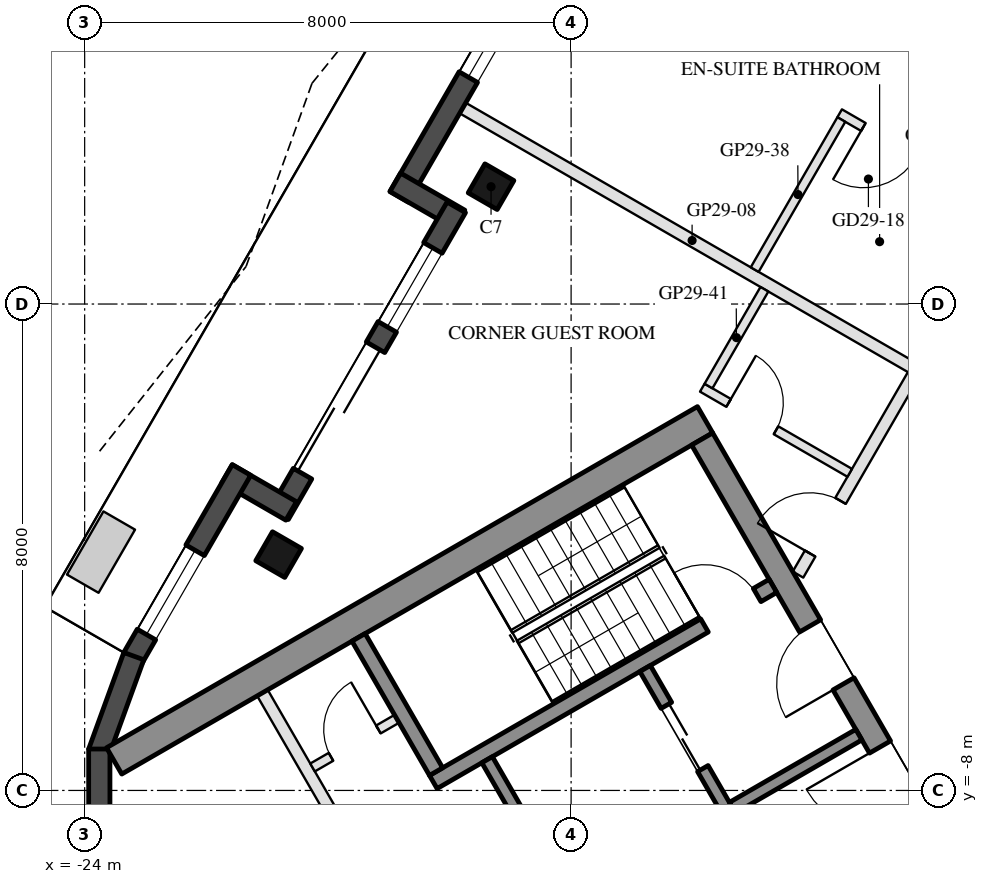
"""IFC4 building model, lengths in metres.
Left out: names, types, materials, properties, quantities, classifications, styles, units other than length and angle.
Written with IfcOpenShell. Run it as: python <this file> out.ifc"""

import sys

from ifc_helpers import new_model, si_unit, direction, frame, frame_2d, origin, origin_2d, place, context, subcontext, project, spatial, rectangle, hollow_rectangle, extrude, boolean, halfspace, element, fill, save


model = new_model("IFC4")
c1 = context("Model", 3, precision=1e-05, world=origin(), true_north=direction((0.0, 1.0)))
c2 = subcontext(c1, "Body", "Model", "MODEL_VIEW")
j1 = project(units=[si_unit("LENGTHUNIT", "METRE"), si_unit("PLANEANGLEUNIT", "RADIAN")], contexts=[c1])
p1 = place(None, origin())
s1 = spatial("IfcSite", under=j1, at=p1, CompositionType="ELEMENT")
p2 = place(p1, origin())
s2 = spatial("IfcBuilding", under=s1, at=p2, CompositionType="ELEMENT")
p3 = place(p2, frame((0.0, 0.0, 294.8)))
s3 = spatial("IfcBuildingStorey", under=s2, at=p3, CompositionType="ELEMENT", Elevation=294.8)
p4 = place(p3, frame((-17.317, 1.93, 0.0), z_axis=(0.0, 0.0, 1.0), x_axis=(0.5, 0.866025403784, 0.0)))
e1 = element("IfcColumn", 1, at=p4, inside=s3, PredefinedType="COLUMN", context=c2, shape_type="SweptSolid", body=[
    boolean("DIFFERENCE", extrude(hollow_rectangle(XDim=0.55, YDim=0.55, WallThickness=0.025, at=origin_2d()), origin(), (0.0, 0.0, 1.0), 3.7), halfspace(frame((0.0, 0.0, 3.666), z_axis=(0.0, 0.0, 1.0), x_axis=(1.0, 0.0, 0.0)), False)),
])
p5 = place(p3, frame((-20.81, -4.121, 0.0), z_axis=(0.0, 0.0, 1.0), x_axis=(0.5, 0.866025403784, 0.0)))
e2 = element("IfcColumn", 2, at=p5, inside=s3, PredefinedType="COLUMN", context=c2, shape_type="SweptSolid", body=[
    boolean("DIFFERENCE", extrude(hollow_rectangle(XDim=0.55, YDim=0.55, WallThickness=0.025, at=origin_2d()), origin(), (0.0, 0.0, 1.0), 3.7), halfspace(frame((0.0, 0.0, 3.66), z_axis=(0.0, 0.0, 1.0), x_axis=(1.0, 0.0, 0.0)), False)),
])
p6 = place(p3, frame((-14.434, 9.373, 0.0), z_axis=(0.0, 0.0, 1.0), x_axis=(-0.499999835575, -0.866025498715, 0.0)))
e3 = element("IfcWall", 3, at=p6, inside=s3, PredefinedType="SOLIDWALL", context=c2, shape_type="SweptSolid", body=[
    extrude(rectangle(XDim=8.787, YDim=0.35, at=frame_2d((4.394, 0.0))), origin(), (0.0, 0.0, 1.0), 3.55),
])
p7 = place(p6, frame((1.719, 0.0, 0.0)))
e4 = element("IfcOpeningElement", 4, at=p7, cuts=e3, PredefinedType="OPENING", context=c2, shape_type="SweptSolid", body=[
    extrude(rectangle(XDim=2.4, YDim=2.4, at=frame_2d((1.2, 1.2))), frame((0.0, 0.185, 0.0), z_axis=(0.0, -1.0, 0.0), x_axis=(1.0, 0.0, 0.0)), (0.0, 0.0, 1.0), 0.37),
])
p8 = place(p6, frame((5.013, 0.0, 0.3)))
e5 = element("IfcOpeningElement", 5, at=p8, cuts=e3, PredefinedType="OPENING", context=c2, shape_type="SweptSolid", body=[
    extrude(rectangle(XDim=1.5, YDim=2.65, at=frame_2d((0.75, 1.325))), frame((0.0, 0.185, 0.0), z_axis=(0.0, -1.0, 0.0), x_axis=(1.0, 0.0, 0.0)), (0.0, 0.0, 1.0), 0.37),
])
p9 = place(p3, frame((-18.892, 2.002, 0.0), z_axis=(0.0, 0.0, 1.0), x_axis=(0.866042269935, -0.499970785833, 0.0)))
e6 = element("IfcWall", 6, at=p9, inside=s3, PredefinedType="SOLIDWALL", context=c2, shape_type="SweptSolid", body=[
    extrude(rectangle(XDim=1.22, YDim=0.35, at=frame_2d((0.61, 0.0))), origin(), (0.0, 0.0, 1.0), 3.55),
])
p10 = place(p3, frame((-17.888, 1.59, 0.0), z_axis=(0.0, 0.0, 1.0), x_axis=(-0.499987198161, -0.866032794804, 0.0)))
e7 = element("IfcWall", 7, at=p10, inside=s3, PredefinedType="SOLIDWALL", context=c2, shape_type="SweptSolid", body=[
    extrude(rectangle(XDim=5.827, YDim=0.35, at=frame_2d((2.914, 0.0))), origin(), (0.0, 0.0, 1.0), 3.55),
])
p11 = place(p10, frame((2.657, 0.0, 0.0)))
e8 = element("IfcOpeningElement", 8, at=p11, cuts=e7, PredefinedType="OPENING", context=c2, shape_type="SweptSolid", body=[
    extrude(rectangle(XDim=2.4, YDim=2.4, at=frame_2d((1.2, 1.2))), frame((0.0, 0.185, 0.0), z_axis=(0.0, -1.0, 0.0), x_axis=(1.0, 0.0, 0.0)), (0.0, 0.0, 1.0), 0.37),
])
p12 = place(p10, frame((0.77, 0.0, 0.3)))
e9 = element("IfcOpeningElement", 9, at=p12, cuts=e7, PredefinedType="OPENING", context=c2, shape_type="SweptSolid", body=[
    extrude(rectangle(XDim=1.5, YDim=2.65, at=frame_2d((0.75, 1.325))), frame((0.0, 0.185, 0.0), z_axis=(0.0, -1.0, 0.0), x_axis=(1.0, 0.0, 0.0)), (0.0, 0.0, 1.0), 0.37),
])
p13 = place(p3, frame((-20.604, -3.403, 0.0), z_axis=(0.0, 0.0, 1.0), x_axis=(-0.866092288191, 0.499884134912, 0.0)))
e10 = element("IfcWall", 10, at=p13, inside=s3, PredefinedType="SOLIDWALL", context=c2, shape_type="SweptSolid", body=[
    extrude(rectangle(XDim=1.22, YDim=0.35, at=frame_2d((0.61, 0.0))), origin(), (0.0, 0.0, 1.0), 3.55),
])
p14 = place(p3, frame((-21.421, -2.729, 0.0), z_axis=(0.0, 0.0, 1.0), x_axis=(-0.500040399856, -0.86600207766, 0.0)))
e11 = element("IfcWall", 11, at=p14, inside=s3, PredefinedType="SOLIDWALL", context=c2, shape_type="SweptSolid", body=[
    extrude(rectangle(XDim=3.567, YDim=0.35, at=frame_2d((1.784, 0.0))), origin(), (0.0, 0.0, 1.0), 3.55),
])
p15 = place(p14, frame((1.525, 0.0, 0.3)))
e12 = element("IfcOpeningElement", 12, at=p15, cuts=e11, PredefinedType="OPENING", context=c2, shape_type="SweptSolid", body=[
    extrude(rectangle(XDim=1.6, YDim=2.65, at=frame_2d((0.8, 1.325))), frame((0.0, 0.185, 0.0), z_axis=(0.0, -1.0, 0.0), x_axis=(1.0, 0.0, 0.0)), (0.0, 0.0, 1.0), 0.37),
])
for number, where, z_axis, x_axis in (
    (13, (-23.192, -5.791, 0.0), (0.0, 0.0, 1.0), (-0.342, -0.94, 0.0)),
    (14, (-23.759, -7.319, 0.0), (0.0, 0.0, 1.0), (0.0, -1.0, 0.0)),
):
    element("IfcWall", number, at=place(p3, frame(where, z_axis=z_axis, x_axis=x_axis)), inside=s3, PredefinedType="SOLIDWALL", context=c2, shape_type="SweptSolid", body=[
        extrude(rectangle(XDim=1.689, YDim=0.35, at=frame_2d((0.845, 0.0))), origin(), (0.0, 0.0, 1.0), 3.55),
    ])
p16 = place(p3, frame((-13.797, -1.903, 0.0), z_axis=(0.0, 0.0, 1.0), x_axis=(-0.866025449148, -0.499999921427, 0.0)))
e15 = element("IfcWall", 15, at=p16, inside=s3, PredefinedType="SHEAR", context=c2, shape_type="SweptSolid", body=[
    extrude(rectangle(XDim=11.222, YDim=0.5, at=frame_2d((5.611, 0.0))), origin(), (0.0, 0.0, 1.0), 3.5),
])
p17 = place(p3, frame((-13.845, -2.22, 0.0), z_axis=(0.0, 0.0, 1.0), x_axis=(0.500004234368, -0.866022959057, 0.0)))
e16 = element("IfcWall", 16, at=p17, inside=s3, PredefinedType="SHEAR", context=c2, shape_type="SweptSolid", body=[
    extrude(rectangle(XDim=10.0, YDim=0.4, at=frame_2d((5.0, 0.0))), origin(), (0.0, 0.0, 1.0), 3.5),
])
p18 = place(p17, frame((3.55, 0.0, 0.0)))
e17 = element("IfcOpeningElement", 17, at=p18, cuts=e16, PredefinedType="OPENING", context=c2, shape_type="SweptSolid", body=[
    extrude(rectangle(XDim=1.1, YDim=2.1, at=frame_2d((0.55, 1.05))), frame((0.0, 0.21, 0.0), z_axis=(0.0, -1.0, 0.0), x_axis=(1.0, 0.0, 0.0)), (0.0, 0.0, 1.0), 0.42),
])
p19 = place(p17, frame((5.85, 0.0, 0.0)))
e18 = element("IfcOpeningElement", 18, at=p19, cuts=e16, PredefinedType="OPENING", context=c2, shape_type="SweptSolid", body=[
    extrude(rectangle(XDim=1.4, YDim=2.1, at=frame_2d((0.7, 1.05))), frame((0.0, 0.21, 0.0), z_axis=(0.0, -1.0, 0.0), x_axis=(1.0, 0.0, 0.0)), (0.0, 0.0, 1.0), 0.42),
])
p20 = place(p3, frame((-12.681, -4.636, 0.0), z_axis=(0.0, 0.0, 1.0), x_axis=(-0.866021702275, -0.500006411147, 0.0)))
e19 = element("IfcWall", 19, at=p20, inside=s3, PredefinedType="SHEAR", context=c2, shape_type="SweptSolid", body=[
    extrude(rectangle(XDim=6.45, YDim=0.25, at=frame_2d((3.225, 0.0))), origin(), (0.0, 0.0, 1.0), 3.5),
])
p21 = place(p20, frame((0.3, 0.0, 0.0)))
e20 = element("IfcOpeningElement", 20, at=p21, cuts=e19, PredefinedType="OPENING", context=c2, shape_type="SweptSolid", body=[
    extrude(rectangle(XDim=1.0, YDim=2.1, at=frame_2d((0.5, 1.05))), frame((0.0, 0.135, 0.0), z_axis=(0.0, -1.0, 0.0), x_axis=(1.0, 0.0, 0.0)), (0.0, 0.0, 1.0), 0.27),
])
p22 = place(p3, frame((-19.496, -5.482, 0.0), z_axis=(0.0, 0.0, 1.0), x_axis=(0.499990435942, -0.866030925526, 0.0)))
e21 = element("IfcWall", 21, at=p22, inside=s3, PredefinedType="SHEAR", context=c2, shape_type="SweptSolid", body=[
    extrude(rectangle(XDim=2.55, YDim=0.25, at=frame_2d((1.275, 0.0))), origin(), (0.0, 0.0, 1.0), 3.5),
])
p23 = place(p3, frame((-17.381, -7.495, 0.0), z_axis=(0.0, 0.0, 1.0), x_axis=(0.500011755427, -0.866018616679, 0.0)))
e22 = element("IfcWall", 22, at=p23, inside=s3, PredefinedType="SHEAR", context=c2, shape_type="SweptSolid", body=[
    extrude(rectangle(XDim=2.8, YDim=0.2, at=frame_2d((1.4, 0.0))), origin(), (0.0, 0.0, 1.0), 3.5),
])
p24 = place(p3, frame((-14.783, -5.995, 0.0), z_axis=(0.0, 0.0, 1.0), x_axis=(0.49994636267, -0.866056369097, 0.0)))
e23 = element("IfcWall", 23, at=p24, inside=s3, PredefinedType="SHEAR", context=c2, shape_type="SweptSolid", body=[
    extrude(rectangle(XDim=2.8, YDim=0.2, at=frame_2d((1.4, 0.0))), origin(), (0.0, 0.0, 1.0), 3.5),
])
p25 = place(p24, frame((0.7, 0.0, 0.0)))
e24 = element("IfcOpeningElement", 24, at=p25, cuts=e23, PredefinedType="OPENING", context=c2, shape_type="SweptSolid", body=[
    extrude(rectangle(XDim=1.2, YDim=2.1, at=frame_2d((0.6, 1.05))), frame((0.0, 0.11, 0.0), z_axis=(0.0, -1.0, 0.0), x_axis=(1.0, 0.0, 0.0)), (0.0, 0.0, 1.0), 0.22),
])
p26 = place(p3, frame((-11.268, -7.083, 0.0), z_axis=(0.0, 0.0, 1.0), x_axis=(-0.866050077142, -0.499957262057, 0.0)))
e25 = element("IfcWall", 25, at=p26, inside=s3, PredefinedType="SHEAR", context=c2, shape_type="SweptSolid", body=[
    extrude(rectangle(XDim=2.4, YDim=0.2, at=frame_2d((1.2, 0.0))), origin(), (0.0, 0.0, 1.0), 3.5),
])
p27 = place(p3, frame((-21.076, -6.395, 0.0), z_axis=(0.0, 0.0, 1.0), x_axis=(0.50001468107, -0.866016927499, 0.0)))
e26 = element("IfcWall", 26, at=p27, inside=s3, PredefinedType="PARTITIONING", context=c2, shape_type="SweptSolid", body=[
    extrude(rectangle(XDim=5.4, YDim=0.2, at=frame_2d((2.7, 0.0))), origin(), (0.0, 0.0, 1.0), 3.5),
])
p28 = place(p27, frame((2.9, 0.0, 0.0)))
e27 = element("IfcOpeningElement", 27, at=p28, cuts=e26, PredefinedType="OPENING", context=c2, shape_type="SweptSolid", body=[
    extrude(rectangle(XDim=0.9, YDim=2.1, at=frame_2d((0.45, 1.05))), frame((0.0, 0.11, 0.0), z_axis=(0.0, -1.0, 0.0), x_axis=(1.0, 0.0, 0.0)), (0.0, 0.0, 1.0), 0.22),
])
p29 = place(p3, frame((-18.866, -6.822, 0.0), z_axis=(0.0, 0.0, 1.0), x_axis=(-0.866028054938, -0.499995408039, 0.0)))
e28 = element("IfcWall", 28, at=p29, inside=s3, PredefinedType="PARTITIONING", context=c2, shape_type="SweptSolid", body=[
    extrude(rectangle(XDim=1.6, YDim=0.15, at=frame_2d((0.8, 0.0))), origin(), (0.0, 0.0, 1.0), 3.5),
])
p30 = place(p29, frame((0.35, 0.0, 0.0)))
e29 = element("IfcOpeningElement", 29, at=p30, cuts=e28, PredefinedType="OPENING", context=c2, shape_type="SweptSolid", body=[
    extrude(rectangle(XDim=0.9, YDim=2.1, at=frame_2d((0.45, 1.05))), frame((0.0, 0.085, 0.0), z_axis=(0.0, -1.0, 0.0), x_axis=(1.0, 0.0, 0.0)), (0.0, 0.0, 1.0), 0.17),
])
p31 = place(p3, frame((-17.782, 3.223, 0.0), z_axis=(0.0, 0.0, 1.0), x_axis=(0.866016642396, -0.500015174863, 0.0)))
e30 = element("IfcWall", 30, at=p31, inside=s3, PredefinedType="PARTITIONING", context=c2, shape_type="SweptSolid", body=[
    extrude(rectangle(XDim=8.712, YDim=0.2, at=frame_2d((4.356, 0.0))), origin(), (0.0, 0.0, 1.0), 3.1),
])
p32 = place(p3, frame((-8.899, 1.587, 0.0), z_axis=(0.0, 0.0, 1.0), x_axis=(-0.86602952684, 0.49999285859, 0.0)))
e31 = element("IfcWall", 31, at=p32, inside=s3, PredefinedType="PARTITIONING", context=c2, shape_type="SweptSolid", body=[
    extrude(rectangle(XDim=3.1, YDim=0.15, at=frame_2d((1.55, 0.0))), origin(), (0.0, 0.0, 1.0), 3.55),
])
p33 = place(p32, frame((1.65, 0.0, 0.0)))
e32 = element("IfcOpeningElement", 32, at=p33, cuts=e31, PredefinedType="OPENING", context=c2, shape_type="SweptSolid", body=[
    extrude(rectangle(XDim=1.0, YDim=2.1, at=frame_2d((0.5, 1.05))), frame((0.0, 0.085, 0.0), z_axis=(0.0, -1.0, 0.0), x_axis=(1.0, 0.0, 0.0)), (0.0, 0.0, 1.0), 0.17),
])
p34 = place(p3, frame((-11.556, 3.034, 0.0), z_axis=(0.0, 0.0, 1.0), x_axis=(-0.500036373335, -0.866004402611, 0.0)))
e33 = element("IfcWall", 33, at=p34, inside=s3, PredefinedType="PARTITIONING", context=c2, shape_type="SweptSolid", body=[
    extrude(rectangle(XDim=2.85, YDim=0.15, at=frame_2d((1.425, 0.0))), origin(), (0.0, 0.0, 1.0), 3.05),
])
p35 = place(p3, frame((-12.269, -4.45, 0.0), z_axis=(0.0, 0.0, 1.0), x_axis=(0.500055316652, 0.865993464345, 0.0)))
e34 = element("IfcWall", 34, at=p35, inside=s3, PredefinedType="PARTITIONING", context=c2, shape_type="SweptSolid", body=[
    extrude(rectangle(XDim=3.788, YDim=0.2, at=frame_2d((1.894, 0.0))), origin(), (0.0, 0.0, 1.0), 3.05),
])
p36 = place(p35, frame((0.4, 0.0, 0.0)))
e35 = element("IfcOpeningElement", 35, at=p36, cuts=e34, PredefinedType="OPENING", context=c2, shape_type="SweptSolid", body=[
    extrude(rectangle(XDim=1.0, YDim=2.1, at=frame_2d((0.5, 1.05))), frame((0.0, 0.11, 0.0), z_axis=(0.0, -1.0, 0.0), x_axis=(1.0, 0.0, 0.0)), (0.0, 0.0, 1.0), 0.22),
])
p37 = place(p3, frame((-13.843, -1.376, 0.0), z_axis=(0.0, 0.0, 1.0), x_axis=(0.866056369097, -0.49994636267, 0.0)))
e36 = element("IfcWall", 36, at=p37, inside=s3, PredefinedType="PARTITIONING", context=c2, shape_type="SweptSolid", body=[
    extrude(rectangle(XDim=2.8, YDim=0.15, at=frame_2d((1.4, 0.0))), origin(), (0.0, 0.0, 1.0), 3.55),
])
p38 = place(p37, frame((0.5, 0.0, 0.0)))
e37 = element("IfcOpeningElement", 37, at=p38, cuts=e36, PredefinedType="OPENING", context=c2, shape_type="SweptSolid", body=[
    extrude(rectangle(XDim=0.9, YDim=2.1, at=frame_2d((0.45, 1.05))), frame((0.0, 0.085, 0.0), z_axis=(0.0, -1.0, 0.0), x_axis=(1.0, 0.0, 0.0)), (0.0, 0.0, 1.0), 0.17),
])
p39 = place(p3, frame((-12.821, 0.243, 0.0), z_axis=(0.0, 0.0, 1.0), x_axis=(-0.500009850223, -0.866019716681, 0.0)))
e38 = element("IfcWall", 38, at=p39, inside=s3, PredefinedType="PARTITIONING", context=c2, shape_type="SweptSolid", body=[
    extrude(rectangle(XDim=1.838, YDim=0.15, at=frame_2d((0.919, 0.0))), origin(), (0.0, 0.0, 1.0), 3.05),
])
p40 = place(p8, origin())
e39 = element("IfcWindow", 39, at=p40, inside=s3, PartitioningType="SINGLE_PANEL", PredefinedType="WINDOW", context=c2, shape_type="SweptSolid", body=[
    extrude(rectangle(XDim=1.5, YDim=2.65, at=frame_2d((0.75, 1.325))), frame((0.0, 0.03, 0.0), z_axis=(0.0, -1.0, 0.0), x_axis=(1.0, 0.0, 0.0)), (0.0, 0.0, 1.0), 0.06),
])
fill(e5, e39)
p41 = place(p11, frame((2.4, 0.0, 0.0), z_axis=(0.0, 0.0, 1.0), x_axis=(-1.0, 0.0, 0.0)))
e40 = element("IfcDoor", 40, at=p41, inside=s3, OperationType="SLIDING_TO_LEFT", PredefinedType="DOOR", context=c2, shape_type="SweptSolid", body=[
    extrude(rectangle(XDim=2.4, YDim=2.4, at=frame_2d((1.2, 1.2))), frame((0.0, 0.025, 0.0), z_axis=(0.0, -1.0, 0.0), x_axis=(1.0, 0.0, 0.0)), (0.0, 0.0, 1.0), 0.05),
])
fill(e8, e40)
p42 = place(p12, origin())
e41 = element("IfcWindow", 41, at=p42, inside=s3, PartitioningType="SINGLE_PANEL", PredefinedType="WINDOW", context=c2, shape_type="SweptSolid", body=[
    extrude(rectangle(XDim=1.5, YDim=2.65, at=frame_2d((0.75, 1.325))), frame((0.0, 0.03, 0.0), z_axis=(0.0, -1.0, 0.0), x_axis=(1.0, 0.0, 0.0)), (0.0, 0.0, 1.0), 0.06),
])
fill(e9, e41)
p43 = place(p15, origin())
e42 = element("IfcWindow", 42, at=p43, inside=s3, PartitioningType="SINGLE_PANEL", PredefinedType="WINDOW", context=c2, shape_type="SweptSolid", body=[
    extrude(rectangle(XDim=1.6, YDim=2.65, at=frame_2d((0.8, 1.325))), frame((0.0, 0.03, 0.0), z_axis=(0.0, -1.0, 0.0), x_axis=(1.0, 0.0, 0.0)), (0.0, 0.0, 1.0), 0.06),
])
fill(e12, e42)
p44 = place(p25, origin())
e43 = element("IfcDoor", 43, at=p44, inside=s3, OperationType="DOUBLE_DOOR_SLIDING", PredefinedType="DOOR", context=c2, shape_type="SweptSolid", body=[
    extrude(rectangle(XDim=1.2, YDim=2.1, at=frame_2d((0.6, 1.05))), frame((0.0, 0.025, 0.0), z_axis=(0.0, -1.0, 0.0), x_axis=(1.0, 0.0, 0.0)), (0.0, 0.0, 1.0), 0.05),
])
fill(e24, e43)
p45 = place(p30, frame((0.9, 0.0, 0.0), z_axis=(0.0, 0.0, 1.0), x_axis=(-1.0, 0.0, 0.0)))
e44 = element("IfcDoor", 44, at=p45, inside=s3, OperationType="SINGLE_SWING_RIGHT", PredefinedType="DOOR", context=c2, shape_type="SweptSolid", body=[
    extrude(rectangle(XDim=0.9, YDim=2.1, at=frame_2d((0.45, 1.05))), frame((0.0, 0.025, 0.0), z_axis=(0.0, -1.0, 0.0), x_axis=(1.0, 0.0, 0.0)), (0.0, 0.0, 1.0), 0.05),
])
fill(e29, e44)
p46 = place(p18, frame((1.1, 0.0, 0.0), z_axis=(0.0, 0.0, 1.0), x_axis=(-1.0, 0.0, 0.0)))
e45 = element("IfcDoor", 45, at=p46, inside=s3, OperationType="SINGLE_SWING_LEFT", PredefinedType="DOOR", context=c2, shape_type="SweptSolid", body=[
    extrude(rectangle(XDim=1.1, YDim=2.1, at=frame_2d((0.55, 1.05))), frame((0.0, 0.025, 0.0), z_axis=(0.0, -1.0, 0.0), x_axis=(1.0, 0.0, 0.0)), (0.0, 0.0, 1.0), 0.05),
])
fill(e17, e45)
p47 = place(p19, frame((1.4, 0.0, 0.0), z_axis=(0.0, 0.0, 1.0), x_axis=(-1.0, 0.0, 0.0)))
e46 = element("IfcDoor", 46, at=p47, inside=s3, OperationType="DOUBLE_DOOR_SINGLE_SWING", PredefinedType="DOOR", context=c2, shape_type="SweptSolid", body=[
    extrude(rectangle(XDim=1.4, YDim=2.1, at=frame_2d((0.7, 1.05))), frame((0.0, 0.025, 0.0), z_axis=(0.0, -1.0, 0.0), x_axis=(1.0, 0.0, 0.0)), (0.0, 0.0, 1.0), 0.05),
])
fill(e18, e46)
p48 = place(p21, frame((1.0, 0.0, 0.0), z_axis=(0.0, 0.0, 1.0), x_axis=(-1.0, 0.0, 0.0)))
e47 = element("IfcDoor", 47, at=p48, inside=s3, OperationType="SINGLE_SWING_LEFT", PredefinedType="DOOR", context=c2, shape_type="SweptSolid", body=[
    extrude(rectangle(XDim=1.0, YDim=2.1, at=frame_2d((0.5, 1.05))), frame((0.0, 0.025, 0.0), z_axis=(0.0, -1.0, 0.0), x_axis=(1.0, 0.0, 0.0)), (0.0, 0.0, 1.0), 0.05),
])
fill(e20, e47)
p49 = place(p33, origin())
e48 = element("IfcDoor", 48, at=p49, inside=s3, OperationType="SINGLE_SWING_RIGHT", PredefinedType="DOOR", context=c2, shape_type="SweptSolid", body=[
    extrude(rectangle(XDim=1.0, YDim=2.1, at=frame_2d((0.5, 1.05))), frame((0.0, 0.025, 0.0), z_axis=(0.0, -1.0, 0.0), x_axis=(1.0, 0.0, 0.0)), (0.0, 0.0, 1.0), 0.05),
])
fill(e32, e48)
p50 = place(p38, origin())
e49 = element("IfcDoor", 49, at=p50, inside=s3, OperationType="SINGLE_SWING_LEFT", PredefinedType="DOOR", context=c2, shape_type="SweptSolid", body=[
    extrude(rectangle(XDim=0.9, YDim=2.1, at=frame_2d((0.45, 1.05))), frame((0.0, 0.025, 0.0), z_axis=(0.0, -1.0, 0.0), x_axis=(1.0, 0.0, 0.0)), (0.0, 0.0, 1.0), 0.05),
])
fill(e37, e49)
p51 = place(p36, origin())
e50 = element("IfcDoor", 50, at=p51, inside=s3, OperationType="SINGLE_SWING_LEFT", PredefinedType="DOOR", context=c2, shape_type="SweptSolid", body=[
    extrude(rectangle(XDim=1.0, YDim=2.1, at=frame_2d((0.5, 1.05))), frame((0.0, 0.025, 0.0), z_axis=(0.0, -1.0, 0.0), x_axis=(1.0, 0.0, 0.0)), (0.0, 0.0, 1.0), 0.05),
])
fill(e35, e50)
save(model, sys.argv[1])
